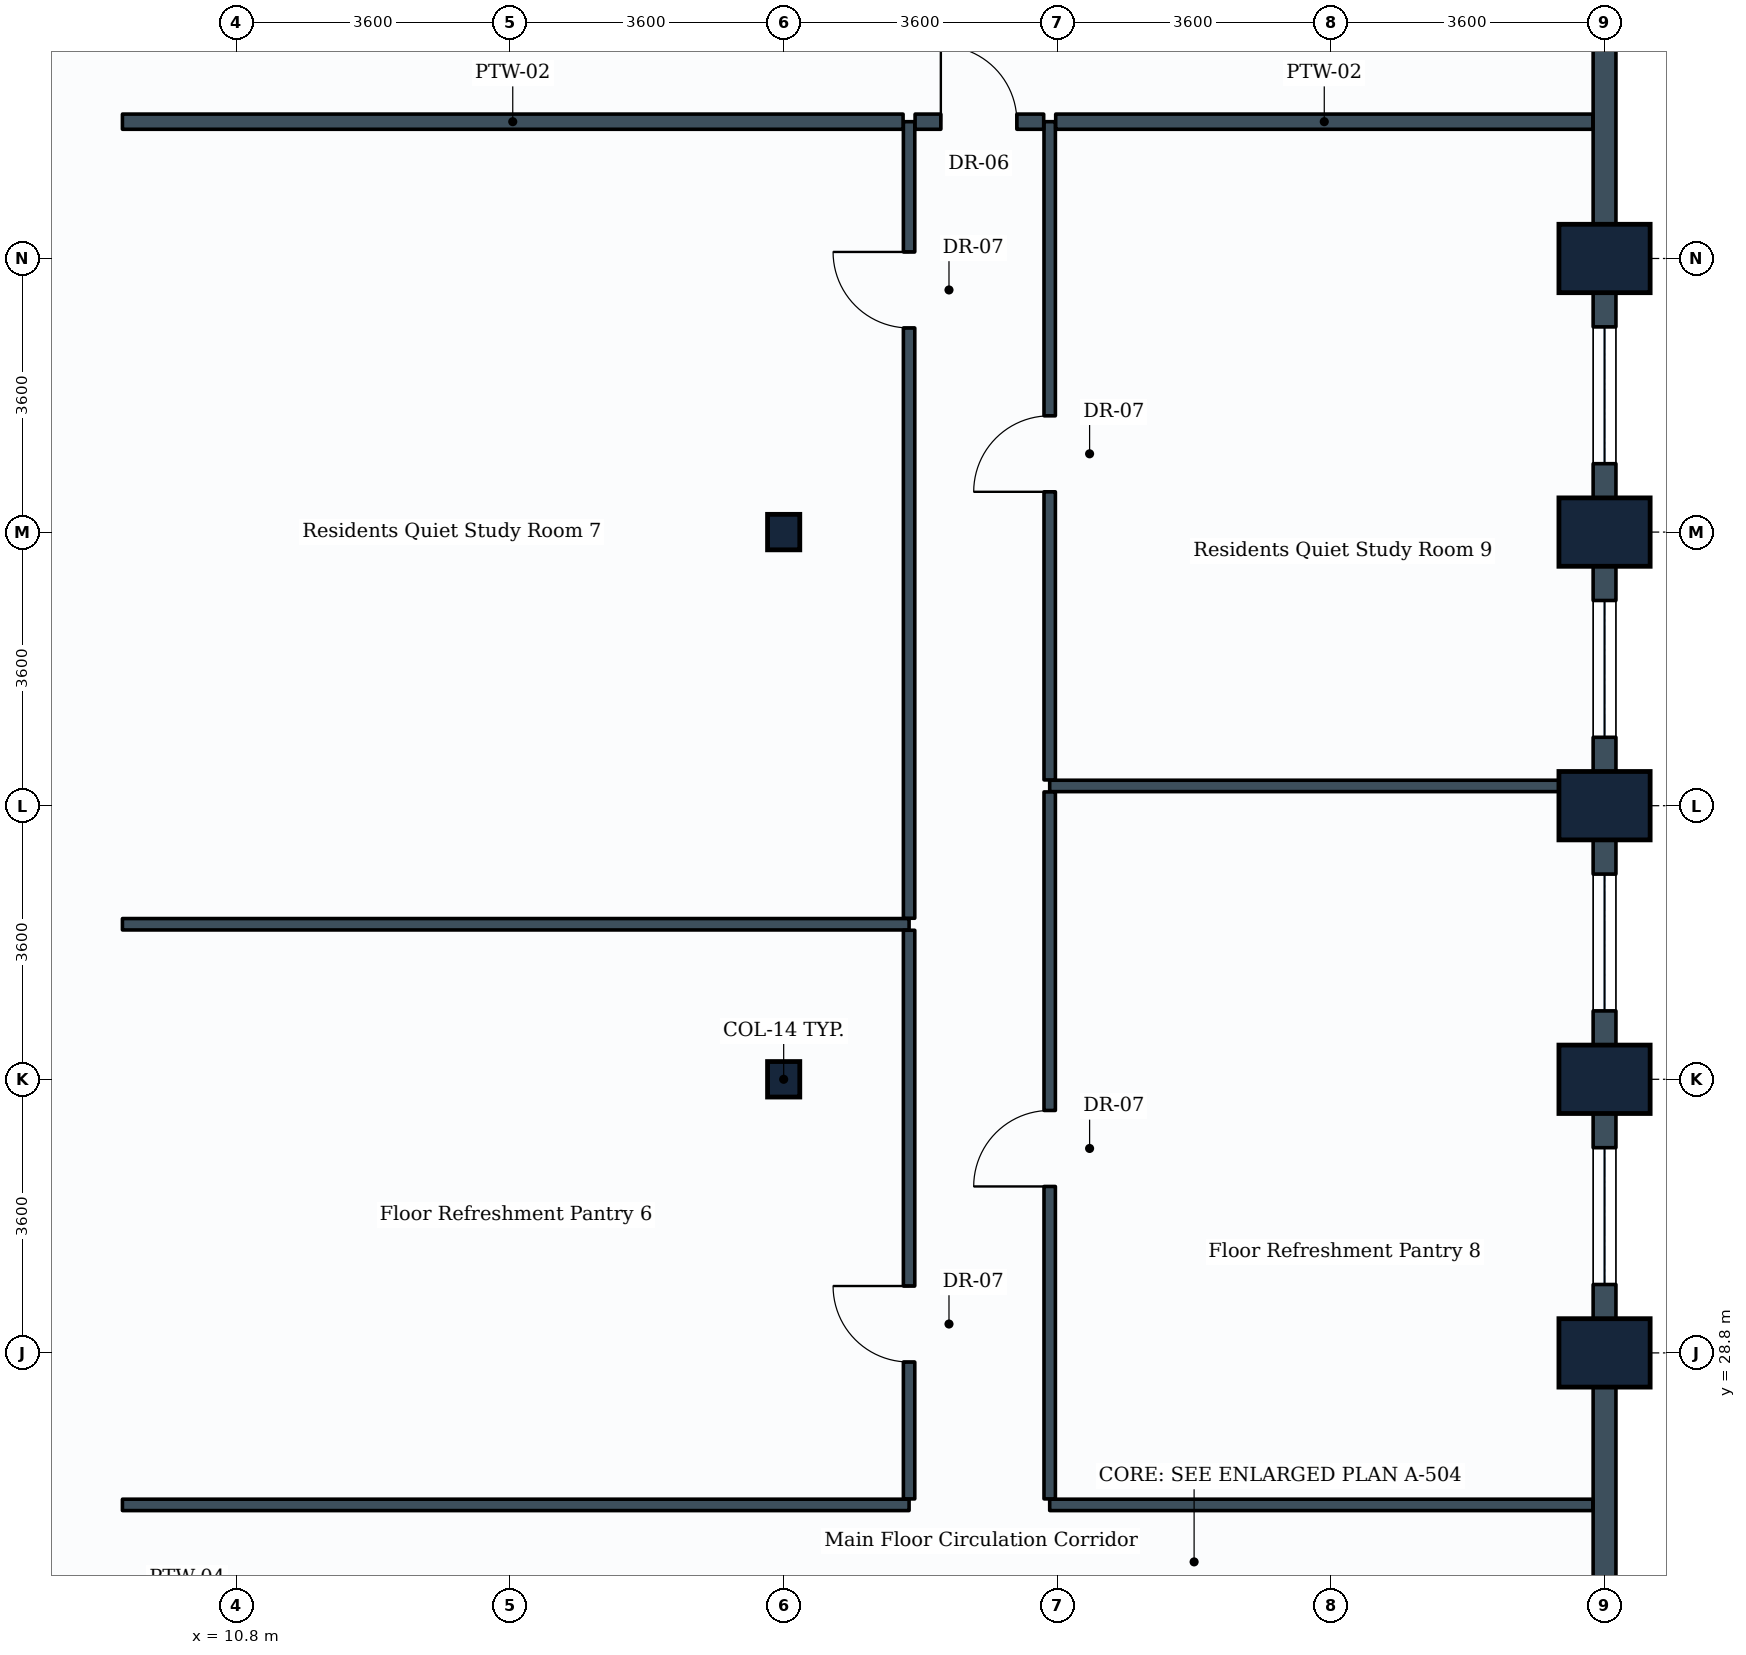
"""IFC4 building model, lengths in metres.
Left out: names, types, materials, properties, quantities, classifications, styles, units other than length and angle.
Written with IfcOpenShell. Run it as: python <this file> out.ifc"""

import sys

from ifc_helpers import new_model, si_unit, direction, frame, frame_2d, origin, origin_2d, place, context, subcontext, project, spatial, rectangle, i_section, extrude, element, fill, save


model = new_model("IFC4")
c1 = context("Model", 3, precision=1e-05, world=origin(), true_north=direction((0.0, 1.0)))
c2 = subcontext(c1, "Body", "Model", "MODEL_VIEW")
j1 = project(units=[si_unit("LENGTHUNIT", "METRE"), si_unit("PLANEANGLEUNIT", "RADIAN")], contexts=[c1])
p1 = place(None, origin())
s1 = spatial("IfcSite", under=j1, at=p1, CompositionType="ELEMENT")
p2 = place(p1, origin())
s2 = spatial("IfcBuilding", under=s1, at=p2, CompositionType="ELEMENT")
p3 = place(p2, frame((0.0, 0.0, 47.4)))
s3 = spatial("IfcBuildingStorey", under=s2, at=p3, CompositionType="ELEMENT", Elevation=47.4)
for number, where, z_axis, x_axis in (
    (1, (18.0, 32.4, 0.0), (0.0, 0.0, 1.0), (1.0, 0.0, 0.0)),
    (2, (18.0, 39.6, 0.0), (0.0, 0.0, 1.0), (1.0, 0.0, 0.0)),
):
    element("IfcColumn", number, at=place(p3, frame(where, z_axis=z_axis, x_axis=x_axis)), inside=s3, PredefinedType="COLUMN", context=c2, shape_type="SweptSolid", body=[
        extrude(i_section(OverallWidth=0.424, OverallDepth=0.467, WebThickness=0.033, FlangeThickness=0.053, FilletRadius=0.015, at=origin_2d()), origin(), (0.0, 0.0, 1.0), 3.9),
    ])
for number, where, z_axis, x_axis in (
    (3, (28.8, 28.8, 0.0), (0.0, 0.0, 1.0), (0.0, 1.0, 0.0)),
    (4, (28.8, 32.4, 0.0), (0.0, 0.0, 1.0), (0.0, 1.0, 0.0)),
    (5, (28.8, 36.0, 0.0), (0.0, 0.0, 1.0), (0.0, 1.0, 0.0)),
    (6, (28.8, 39.6, 0.0), (0.0, 0.0, 1.0), (0.0, 1.0, 0.0)),
    (7, (28.8, 43.2, 0.0), (0.0, 0.0, 1.0), (0.0, 1.0, 0.0)),
):
    element("IfcColumn", number, at=place(p3, frame(where, z_axis=z_axis, x_axis=x_axis)), inside=s3, PredefinedType="COLUMN", context=c2, shape_type="SweptSolid", body=[
        extrude(rectangle(XDim=0.9, YDim=1.2, at=origin_2d()), origin(), (0.0, 0.0, 1.0), 3.9),
    ])
p4 = place(p3, frame((28.8, 25.2, 0.0), z_axis=(0.0, 0.0, 1.0), x_axis=(0.0, 1.0, 0.0)))
e8 = element("IfcWall", 8, at=p4, inside=s3, PredefinedType="STANDARD", context=c2, shape_type="SweptSolid", body=[
    extrude(rectangle(XDim=3.6, YDim=0.3, at=frame_2d((1.8, 0.0))), origin(), (0.0, 0.0, 1.0), 3.14),
])
p5 = place(p3, frame((28.8, 28.8, 0.0), z_axis=(0.0, 0.0, 1.0), x_axis=(0.0, 1.0, 0.0)))
e9 = element("IfcWall", 9, at=p5, inside=s3, PredefinedType="STANDARD", context=c2, shape_type="SweptSolid", body=[
    extrude(rectangle(XDim=3.6, YDim=0.3, at=frame_2d((1.8, 0.0))), origin(), (0.0, 0.0, 1.0), 2.93),
])
p6 = place(p5, frame((0.9, 0.0, 0.85)))
e10 = element("IfcOpeningElement", 10, at=p6, cuts=e9, PredefinedType="OPENING", context=c2, shape_type="SweptSolid", body=[
    extrude(rectangle(XDim=1.8, YDim=1.35, at=frame_2d((0.9, 0.675))), frame((0.0, 0.16, 0.0), z_axis=(0.0, -1.0, 0.0), x_axis=(1.0, 0.0, 0.0)), (0.0, 0.0, 1.0), 0.32),
])
p7 = place(p3, frame((28.8, 32.4, 0.0), z_axis=(0.0, 0.0, 1.0), x_axis=(0.0, 1.0, 0.0)))
e11 = element("IfcWall", 11, at=p7, inside=s3, PredefinedType="STANDARD", context=c2, shape_type="SweptSolid", body=[
    extrude(rectangle(XDim=3.6, YDim=0.3, at=frame_2d((1.8, 0.0))), origin(), (0.0, 0.0, 1.0), 2.93),
])
p8 = place(p7, frame((0.9, 0.0, 0.85)))
e12 = element("IfcOpeningElement", 12, at=p8, cuts=e11, PredefinedType="OPENING", context=c2, shape_type="SweptSolid", body=[
    extrude(rectangle(XDim=1.8, YDim=1.35, at=frame_2d((0.9, 0.675))), frame((0.0, 0.16, 0.0), z_axis=(0.0, -1.0, 0.0), x_axis=(1.0, 0.0, 0.0)), (0.0, 0.0, 1.0), 0.32),
])
p9 = place(p3, frame((28.8, 36.0, 0.0), z_axis=(0.0, 0.0, 1.0), x_axis=(0.0, 1.0, 0.0)))
e13 = element("IfcWall", 13, at=p9, inside=s3, PredefinedType="STANDARD", context=c2, shape_type="SweptSolid", body=[
    extrude(rectangle(XDim=3.6, YDim=0.3, at=frame_2d((1.8, 0.0))), origin(), (0.0, 0.0, 1.0), 2.93),
])
p10 = place(p9, frame((0.9, 0.0, 0.85)))
e14 = element("IfcOpeningElement", 14, at=p10, cuts=e13, PredefinedType="OPENING", context=c2, shape_type="SweptSolid", body=[
    extrude(rectangle(XDim=1.8, YDim=1.35, at=frame_2d((0.9, 0.675))), frame((0.0, 0.16, 0.0), z_axis=(0.0, -1.0, 0.0), x_axis=(1.0, 0.0, 0.0)), (0.0, 0.0, 1.0), 0.32),
])
p11 = place(p3, frame((28.8, 39.6, 0.0), z_axis=(0.0, 0.0, 1.0), x_axis=(0.0, 1.0, 0.0)))
e15 = element("IfcWall", 15, at=p11, inside=s3, PredefinedType="STANDARD", context=c2, shape_type="SweptSolid", body=[
    extrude(rectangle(XDim=3.6, YDim=0.3, at=frame_2d((1.8, 0.0))), origin(), (0.0, 0.0, 1.0), 2.93),
])
p12 = place(p11, frame((0.9, 0.0, 0.85)))
e16 = element("IfcOpeningElement", 16, at=p12, cuts=e15, PredefinedType="OPENING", context=c2, shape_type="SweptSolid", body=[
    extrude(rectangle(XDim=1.8, YDim=1.35, at=frame_2d((0.9, 0.675))), frame((0.0, 0.16, 0.0), z_axis=(0.0, -1.0, 0.0), x_axis=(1.0, 0.0, 0.0)), (0.0, 0.0, 1.0), 0.32),
])
p13 = place(p3, frame((28.8, 43.2, 0.0), z_axis=(0.0, 0.0, 1.0), x_axis=(0.0, 1.0, 0.0)))
e17 = element("IfcWall", 17, at=p13, inside=s3, PredefinedType="STANDARD", context=c2, shape_type="SweptSolid", body=[
    extrude(rectangle(XDim=3.6, YDim=0.3, at=frame_2d((1.8, 0.0))), origin(), (0.0, 0.0, 1.0), 2.93),
])
p14 = place(p3, frame((9.3, 26.8, 0.0), z_axis=(0.0, 0.0, 1.0), x_axis=(1.0, 0.0, 0.0)))
e18 = element("IfcWall", 18, at=p14, inside=s3, PredefinedType="PARTITIONING", context=c2, shape_type="SweptSolid", body=[
    extrude(rectangle(XDim=10.35, YDim=0.15, at=frame_2d((5.175, 0.0))), origin(), (0.0, 0.0, 1.0), 3.08),
])
p15 = place(p3, frame((9.3, 34.44, 0.0), z_axis=(0.0, 0.0, 1.0), x_axis=(1.0, 0.0, 0.0)))
e19 = element("IfcWall", 19, at=p15, inside=s3, PredefinedType="PARTITIONING", context=c2, shape_type="SweptSolid", body=[
    extrude(rectangle(XDim=10.35, YDim=0.15, at=frame_2d((5.175, 0.0))), origin(), (0.0, 0.0, 1.0), 3.03),
])
p16 = place(p3, frame((19.65, 26.879, 0.0), z_axis=(0.0, 0.0, 1.0), x_axis=(0.0, 1.0, 0.0)))
e20 = element("IfcWall", 20, at=p16, inside=s3, PredefinedType="PARTITIONING", context=c2, shape_type="SweptSolid", body=[
    extrude(rectangle(XDim=7.482, YDim=0.15, at=frame_2d((3.741, 0.0))), origin(), (0.0, 0.0, 1.0), 3.08),
])
p17 = place(p16, frame((1.801, 0.0, 0.0)))
e21 = element("IfcOpeningElement", 21, at=p17, cuts=e20, PredefinedType="OPENING", context=c2, shape_type="SweptSolid", body=[
    extrude(rectangle(XDim=1.0, YDim=2.1, at=frame_2d((0.5, 1.05))), frame((0.0, 0.085, 0.0), z_axis=(0.0, -1.0, 0.0), x_axis=(1.0, 0.0, 0.0)), (0.0, 0.0, 1.0), 0.17),
])
p18 = place(p3, frame((19.65, 34.519, 0.0), z_axis=(0.0, 0.0, 1.0), x_axis=(0.0, 1.0, 0.0)))
e22 = element("IfcWall", 22, at=p18, inside=s3, PredefinedType="PARTITIONING", context=c2, shape_type="SweptSolid", body=[
    extrude(rectangle(XDim=10.481, YDim=0.15, at=frame_2d((5.24, 0.0))), origin(), (0.0, 0.0, 1.0), 3.08),
])
p19 = place(p18, frame((7.767, 0.0, 0.0)))
e23 = element("IfcOpeningElement", 23, at=p19, cuts=e22, PredefinedType="OPENING", context=c2, shape_type="SweptSolid", body=[
    extrude(rectangle(XDim=1.0, YDim=2.1, at=frame_2d((0.5, 1.05))), frame((0.0, 0.085, 0.0), z_axis=(0.0, -1.0, 0.0), x_axis=(1.0, 0.0, 0.0)), (0.0, 0.0, 1.0), 0.17),
])
p20 = place(p3, frame((21.5, 26.8, 0.0), z_axis=(0.0, 0.0, 1.0), x_axis=(1.0, 0.0, 0.0)))
e24 = element("IfcWall", 24, at=p20, inside=s3, PredefinedType="PARTITIONING", context=c2, shape_type="SweptSolid", body=[
    extrude(rectangle(XDim=7.146, YDim=0.15, at=frame_2d((3.573, 0.0))), origin(), (0.0, 0.0, 1.0), 3.635),
])
p21 = place(p3, frame((21.5, 36.26, 0.0), z_axis=(0.0, 0.0, 1.0), x_axis=(1.0, 0.0, 0.0)))
e25 = element("IfcWall", 25, at=p21, inside=s3, PredefinedType="PARTITIONING", context=c2, shape_type="SweptSolid", body=[
    extrude(rectangle(XDim=7.146, YDim=0.15, at=frame_2d((3.573, 0.0))), origin(), (0.0, 0.0, 1.0), 2.93),
])
p22 = place(p3, frame((21.5, 26.879, 0.0), z_axis=(0.0, 0.0, 1.0), x_axis=(0.0, 1.0, 0.0)))
e26 = element("IfcWall", 26, at=p22, inside=s3, PredefinedType="PARTITIONING", context=c2, shape_type="SweptSolid", body=[
    extrude(rectangle(XDim=9.302, YDim=0.15, at=frame_2d((4.651, 0.0))), origin(), (0.0, 0.0, 1.0), 3.08),
])
p23 = place(p22, frame((4.111, 0.0, 0.0)))
e27 = element("IfcOpeningElement", 27, at=p23, cuts=e26, PredefinedType="OPENING", context=c2, shape_type="SweptSolid", body=[
    extrude(rectangle(XDim=1.0, YDim=2.1, at=frame_2d((0.5, 1.05))), frame((0.0, 0.085, 0.0), z_axis=(0.0, -1.0, 0.0), x_axis=(1.0, 0.0, 0.0)), (0.0, 0.0, 1.0), 0.17),
])
p24 = place(p3, frame((21.5, 36.339, 0.0), z_axis=(0.0, 0.0, 1.0), x_axis=(0.0, 1.0, 0.0)))
e28 = element("IfcWall", 28, at=p24, inside=s3, PredefinedType="PARTITIONING", context=c2, shape_type="SweptSolid", body=[
    extrude(rectangle(XDim=8.661, YDim=0.15, at=frame_2d((4.331, 0.0))), origin(), (0.0, 0.0, 1.0), 3.03),
])
p25 = place(p24, frame((3.791, 0.0, 0.0)))
e29 = element("IfcOpeningElement", 29, at=p25, cuts=e28, PredefinedType="OPENING", context=c2, shape_type="SweptSolid", body=[
    extrude(rectangle(XDim=1.0, YDim=2.1, at=frame_2d((0.5, 1.05))), frame((0.0, 0.085, 0.0), z_axis=(0.0, -1.0, 0.0), x_axis=(1.0, 0.0, 0.0)), (0.0, 0.0, 1.0), 0.17),
])
p26 = place(p3, frame((9.3, 45.0, 0.0), z_axis=(0.0, 0.0, 1.0), x_axis=(1.0, 0.0, 0.0)))
e30 = element("IfcWall", 30, at=p26, inside=s3, PredefinedType="PARTITIONING", context=c2, shape_type="SweptSolid", body=[
    extrude(rectangle(XDim=10.271, YDim=0.2, at=frame_2d((5.135, 0.0))), origin(), (0.0, 0.0, 1.0), 3.08),
])
p27 = place(p3, frame((21.579, 45.0, 0.0), z_axis=(0.0, 0.0, 1.0), x_axis=(1.0, 0.0, 0.0)))
e31 = element("IfcWall", 31, at=p27, inside=s3, PredefinedType="PARTITIONING", context=c2, shape_type="SweptSolid", body=[
    extrude(rectangle(XDim=7.067, YDim=0.2, at=frame_2d((3.533, 0.0))), origin(), (0.0, 0.0, 1.0), 2.93),
])
p28 = place(p3, frame((19.729, 45.0, 0.0), z_axis=(0.0, 0.0, 1.0), x_axis=(1.0, 0.0, 0.0)))
e32 = element("IfcWall", 32, at=p28, inside=s3, PredefinedType="PARTITIONING", context=c2, shape_type="SweptSolid", body=[
    extrude(rectangle(XDim=1.692, YDim=0.2, at=frame_2d((0.846, 0.0))), origin(), (0.0, 0.0, 1.0), 3.635),
])
p29 = place(p28, frame((0.339, 0.0, 0.0)))
e33 = element("IfcOpeningElement", 33, at=p29, cuts=e32, PredefinedType="OPENING", context=c2, shape_type="SweptSolid", body=[
    extrude(rectangle(XDim=1.0, YDim=2.1, at=frame_2d((0.5, 1.05))), frame((0.0, 0.11, 0.0), z_axis=(0.0, -1.0, 0.0), x_axis=(1.0, 0.0, 0.0)), (0.0, 0.0, 1.0), 0.22),
])
p30 = place(p6, origin())
e34 = element("IfcWindow", 34, at=p30, inside=s3, PartitioningType="SINGLE_PANEL", PredefinedType="WINDOW", context=c2, shape_type="SweptSolid", body=[
    extrude(rectangle(XDim=1.8, YDim=1.35, at=frame_2d((0.9, 0.675))), frame((0.0, 0.03, 0.0), z_axis=(0.0, -1.0, 0.0), x_axis=(1.0, 0.0, 0.0)), (0.0, 0.0, 1.0), 0.06),
])
fill(e10, e34)
p31 = place(p8, origin())
e35 = element("IfcWindow", 35, at=p31, inside=s3, PartitioningType="SINGLE_PANEL", PredefinedType="WINDOW", context=c2, shape_type="SweptSolid", body=[
    extrude(rectangle(XDim=1.8, YDim=1.35, at=frame_2d((0.9, 0.675))), frame((0.0, 0.03, 0.0), z_axis=(0.0, -1.0, 0.0), x_axis=(1.0, 0.0, 0.0)), (0.0, 0.0, 1.0), 0.06),
])
fill(e12, e35)
p32 = place(p10, origin())
e36 = element("IfcWindow", 36, at=p32, inside=s3, PartitioningType="SINGLE_PANEL", PredefinedType="WINDOW", context=c2, shape_type="SweptSolid", body=[
    extrude(rectangle(XDim=1.8, YDim=1.35, at=frame_2d((0.9, 0.675))), frame((0.0, 0.03, 0.0), z_axis=(0.0, -1.0, 0.0), x_axis=(1.0, 0.0, 0.0)), (0.0, 0.0, 1.0), 0.06),
])
fill(e14, e36)
p33 = place(p12, origin())
e37 = element("IfcWindow", 37, at=p33, inside=s3, PartitioningType="SINGLE_PANEL", PredefinedType="WINDOW", context=c2, shape_type="SweptSolid", body=[
    extrude(rectangle(XDim=1.8, YDim=1.35, at=frame_2d((0.9, 0.675))), frame((0.0, 0.03, 0.0), z_axis=(0.0, -1.0, 0.0), x_axis=(1.0, 0.0, 0.0)), (0.0, 0.0, 1.0), 0.06),
])
fill(e16, e37)
p34 = place(p17, origin())
e38 = element("IfcDoor", 38, at=p34, inside=s3, OperationType="SINGLE_SWING_RIGHT", PredefinedType="DOOR", context=c2, shape_type="SweptSolid", body=[
    extrude(rectangle(XDim=1.0, YDim=2.1, at=frame_2d((0.5, 1.05))), frame((0.0, 0.025, 0.0), z_axis=(0.0, -1.0, 0.0), x_axis=(1.0, 0.0, 0.0)), (0.0, 0.0, 1.0), 0.05),
])
fill(e21, e38)
p35 = place(p19, origin())
e39 = element("IfcDoor", 39, at=p35, inside=s3, OperationType="SINGLE_SWING_RIGHT", PredefinedType="DOOR", context=c2, shape_type="SweptSolid", body=[
    extrude(rectangle(XDim=1.0, YDim=2.1, at=frame_2d((0.5, 1.05))), frame((0.0, 0.025, 0.0), z_axis=(0.0, -1.0, 0.0), x_axis=(1.0, 0.0, 0.0)), (0.0, 0.0, 1.0), 0.05),
])
fill(e23, e39)
p36 = place(p23, origin())
e40 = element("IfcDoor", 40, at=p36, inside=s3, OperationType="SINGLE_SWING_LEFT", PredefinedType="DOOR", context=c2, shape_type="SweptSolid", body=[
    extrude(rectangle(XDim=1.0, YDim=2.1, at=frame_2d((0.5, 1.05))), frame((0.0, 0.025, 0.0), z_axis=(0.0, -1.0, 0.0), x_axis=(1.0, 0.0, 0.0)), (0.0, 0.0, 1.0), 0.05),
])
fill(e27, e40)
p37 = place(p25, origin())
e41 = element("IfcDoor", 41, at=p37, inside=s3, OperationType="SINGLE_SWING_LEFT", PredefinedType="DOOR", context=c2, shape_type="SweptSolid", body=[
    extrude(rectangle(XDim=1.0, YDim=2.1, at=frame_2d((0.5, 1.05))), frame((0.0, 0.025, 0.0), z_axis=(0.0, -1.0, 0.0), x_axis=(1.0, 0.0, 0.0)), (0.0, 0.0, 1.0), 0.05),
])
fill(e29, e41)
p38 = place(p29, origin())
e42 = element("IfcDoor", 42, at=p38, inside=s3, OperationType="SINGLE_SWING_LEFT", PredefinedType="DOOR", context=c2, shape_type="SweptSolid", body=[
    extrude(rectangle(XDim=1.0, YDim=2.1, at=frame_2d((0.5, 1.05))), frame((0.0, 0.025, 0.0), z_axis=(0.0, -1.0, 0.0), x_axis=(1.0, 0.0, 0.0)), (0.0, 0.0, 1.0), 0.05),
])
fill(e33, e42)
save(model, sys.argv[1])
